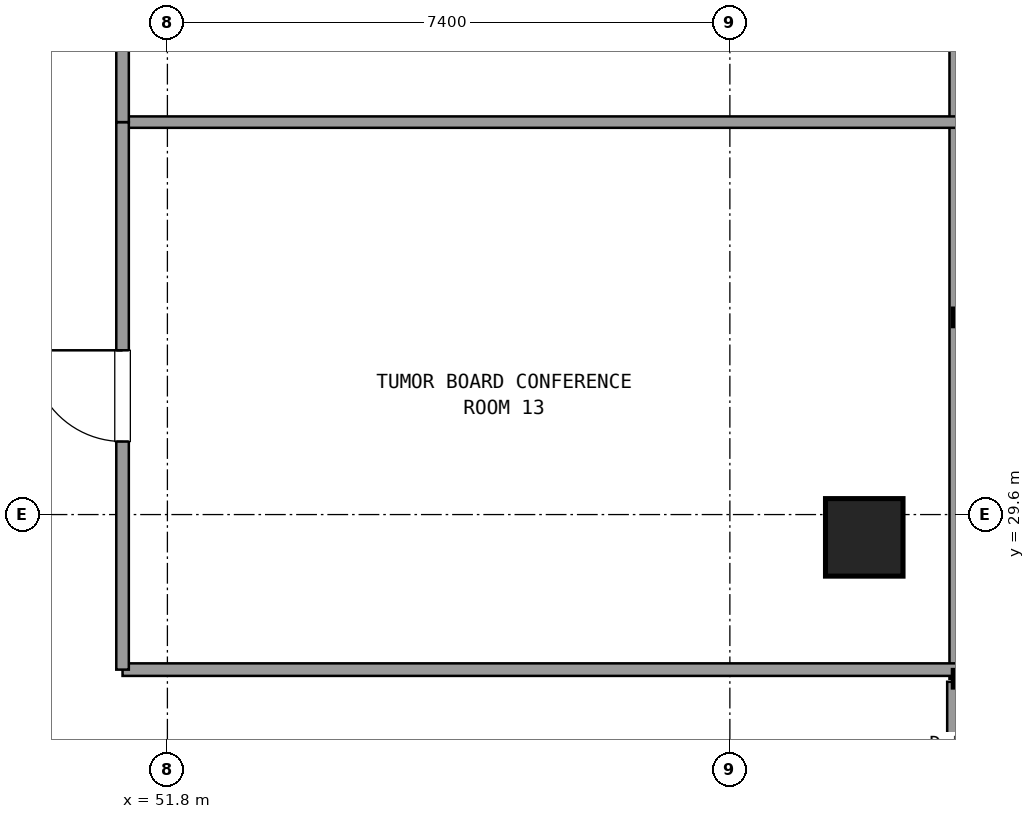
"""IFC4 building model, lengths in metres.
Left out: names, types, materials, properties, quantities, classifications, styles, units other than length and angle.
Written with IfcOpenShell. Run it as: python <this file> out.ifc"""

import sys

from ifc_helpers import new_model, si_unit, direction, frame, frame_2d, origin, origin_2d, place, context, subcontext, project, spatial, rectangle, extrude, element, fill, save


model = new_model("IFC4")
c1 = context("Model", 3, precision=1e-05, world=origin(), true_north=direction((0.0, 1.0)))
c2 = subcontext(c1, "Body", "Model", "MODEL_VIEW")
j1 = project(units=[si_unit("LENGTHUNIT", "METRE"), si_unit("PLANEANGLEUNIT", "RADIAN")], contexts=[c1])
p1 = place(None, origin())
s1 = spatial("IfcSite", under=j1, at=p1, CompositionType="ELEMENT")
p2 = place(p1, origin())
s2 = spatial("IfcBuilding", under=s1, at=p2, CompositionType="ELEMENT")
p3 = place(p2, frame((0.0, 0.0, 106.38)))
s3 = spatial("IfcBuildingStorey", under=s2, at=p3, CompositionType="ELEMENT", Elevation=106.38)
p4 = place(p3, frame((60.968, 29.3, 0.021), z_axis=(-0.084573087246, 0.0, 0.99641727851), x_axis=(0.0, -1.0, 0.0)))
e1 = element("IfcColumn", 1, at=p4, inside=s3, PredefinedType="COLUMN", context=c2, shape_type="SweptSolid", body=[
    extrude(rectangle(XDim=1.02, YDim=1.02, at=origin_2d()), origin(), (0.0, 0.0, 1.0), 3.571),
])
p5 = place(p3, frame((62.209, 24.4, 0.0), z_axis=(0.0, 0.0, 1.0), x_axis=(0.0, 1.0, 0.0)))
e2 = element("IfcWall", 2, at=p5, inside=s3, PredefinedType="SOLIDWALL", context=c2, shape_type="SweptSolid", body=[
    extrude(rectangle(XDim=3.0, YDim=0.3, at=frame_2d((1.5, 0.0))), origin(), (0.0, 0.0, 1.0), 2.67),
])
p6 = place(p5, frame((0.9, 0.0, 0.0)))
e3 = element("IfcOpeningElement", 3, at=p6, cuts=e2, PredefinedType="OPENING", context=c2, shape_type="SweptSolid", body=[
    extrude(rectangle(XDim=1.2, YDim=2.2, at=frame_2d((0.6, 1.1))), frame((0.0, 0.16, 0.0), z_axis=(0.0, -1.0, 0.0), x_axis=(1.0, 0.0, 0.0)), (0.0, 0.0, 1.0), 0.32),
])
p7 = place(p3, frame((62.209, 27.44, 0.0), z_axis=(0.0, 0.0, 1.0), x_axis=(0.0, 1.0, 0.0)))
e4 = element("IfcWall", 4, at=p7, inside=s3, PredefinedType="SOLIDWALL", context=c2, shape_type="SweptSolid", body=[
    extrude(rectangle(XDim=14.262, YDim=0.24, at=frame_2d((7.131, 0.0))), origin(), (0.0, 0.0, 1.0), 0.85),
])
p8 = place(p3, frame((51.21, 27.56, 0.0), z_axis=(0.0, 0.0, 1.0), x_axis=(1.0, 0.0, 0.0)))
e5 = element("IfcWall", 5, at=p8, inside=s3, PredefinedType="PARTITIONING", context=c2, shape_type="SweptSolid", body=[
    extrude(rectangle(XDim=10.979, YDim=0.165, at=frame_2d((5.49, 0.0))), origin(), (0.0, 0.0, 1.0), 2.61),
])
p9 = place(p3, frame((51.21, 34.763, 0.0), z_axis=(0.0, 0.0, 1.0), x_axis=(1.0, 0.0, 0.0)))
e6 = element("IfcWall", 6, at=p9, inside=s3, PredefinedType="PARTITIONING", context=c2, shape_type="SweptSolid", body=[
    extrude(rectangle(XDim=10.979, YDim=0.15, at=frame_2d((5.49, 0.0))), origin(), (0.0, 0.0, 1.0), 2.61),
])
p10 = place(p3, frame((51.21, 27.56, 0.0), z_axis=(0.0, 0.0, 1.0), x_axis=(0.0, 1.0, 0.0)))
e7 = element("IfcWall", 7, at=p10, inside=s3, PredefinedType="PARTITIONING", context=c2, shape_type="SweptSolid", body=[
    extrude(rectangle(XDim=7.203, YDim=0.165, at=frame_2d((3.602, 0.0))), origin(), (0.0, 0.0, 1.0), 2.61),
])
p11 = place(p10, frame((3.001, 0.0, 0.0)))
e8 = element("IfcOpeningElement", 8, at=p11, cuts=e7, PredefinedType="OPENING", context=c2, shape_type="SweptSolid", body=[
    extrude(rectangle(XDim=1.2, YDim=2.15, at=frame_2d((0.6, 1.075))), frame((0.0, 0.093, 0.0), z_axis=(0.0, -1.0, 0.0), x_axis=(1.0, 0.0, 0.0)), (0.0, 0.0, 1.0), 0.185),
])
p12 = place(p3, frame((51.21, 34.763, 0.0), z_axis=(0.0, 0.0, 1.0), x_axis=(0.0, 1.0, 0.0)))
e9 = element("IfcWall", 9, at=p12, inside=s3, PredefinedType="PARTITIONING", context=c2, shape_type="SweptSolid", body=[
    extrude(rectangle(XDim=5.659, YDim=0.165, at=frame_2d((2.83, 0.0))), origin(), (0.0, 0.0, 1.0), 2.61),
])
p13 = place(p12, frame((2.229, 0.0, 0.0)))
e10 = element("IfcOpeningElement", 10, at=p13, cuts=e9, PredefinedType="OPENING", context=c2, shape_type="SweptSolid", body=[
    extrude(rectangle(XDim=1.2, YDim=2.15, at=frame_2d((0.6, 1.075))), frame((0.0, 0.093, 0.0), z_axis=(0.0, -1.0, 0.0), x_axis=(1.0, 0.0, 0.0)), (0.0, 0.0, 1.0), 0.185),
])
p14 = place(p11, origin())
e11 = element("IfcDoor", 11, at=p14, inside=s3, OperationType="SINGLE_SWING_RIGHT", PredefinedType="DOOR", context=c2, shape_type="SweptSolid", body=[
    extrude(rectangle(XDim=1.2, YDim=2.15, at=frame_2d((0.6, 1.075))), frame((0.0, 0.025, 0.0), z_axis=(0.0, -1.0, 0.0), x_axis=(1.0, 0.0, 0.0)), (0.0, 0.0, 1.0), 0.05),
])
fill(e8, e11)
save(model, sys.argv[1])
